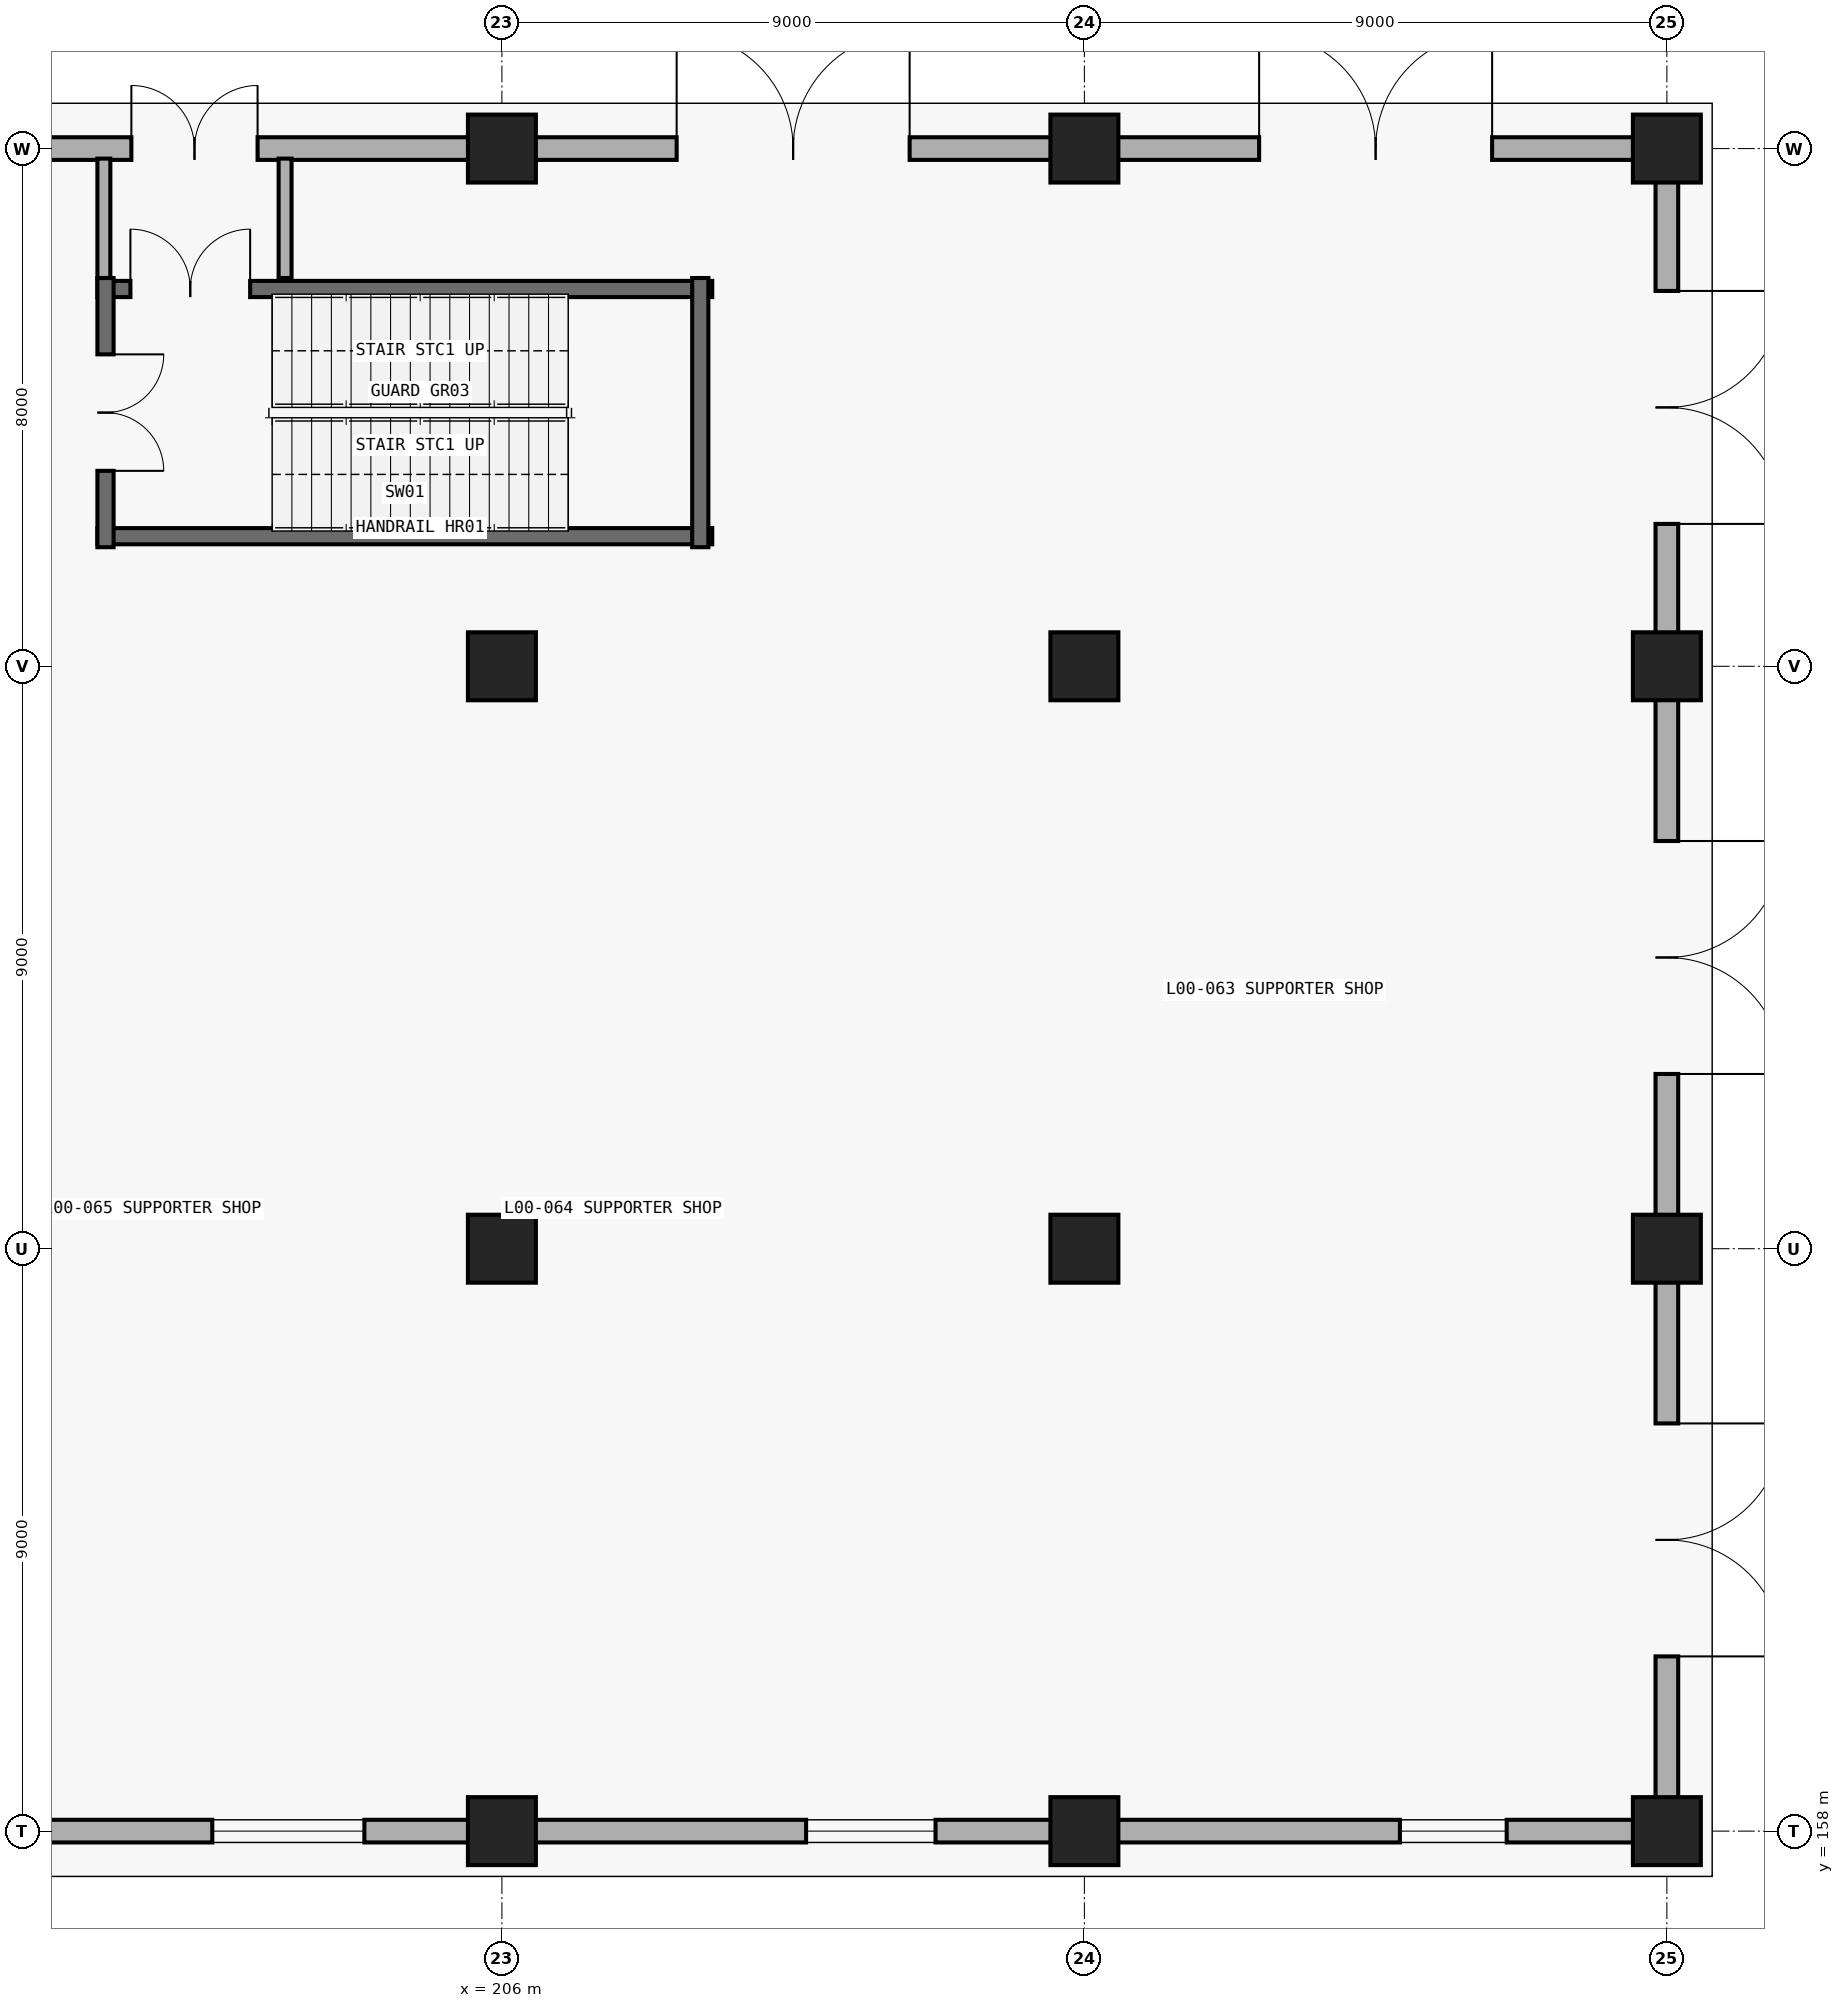
"""IFC4 building model, lengths in metres.
Left out: names, types, materials, properties, quantities, classifications, styles, units other than length and angle.
Written with IfcOpenShell. Run it as: python <this file> out.ifc"""

import sys

from ifc_helpers import new_model, si_unit, direction, frame, frame_2d, origin, origin_2d, place, context, subcontext, project, spatial, rectangle, extrude, element, fill, save


model = new_model("IFC4")
c1 = context("Model", 3, precision=1e-05, world=origin(), true_north=direction((0.0, 1.0)))
c2 = subcontext(c1, "Body", "Model", "MODEL_VIEW")
j1 = project(units=[si_unit("LENGTHUNIT", "METRE"), si_unit("PLANEANGLEUNIT", "RADIAN")], contexts=[c1])
p1 = place(None, origin())
s1 = spatial("IfcSite", under=j1, at=p1, CompositionType="ELEMENT")
p2 = place(p1, origin())
s2 = spatial("IfcBuilding", under=s1, at=p2, CompositionType="ELEMENT")
p3 = place(p2, origin())
s3 = spatial("IfcBuildingStorey", under=s2, at=p3, CompositionType="ELEMENT", Elevation=0.0)
for number, where, z_axis, x_axis in (
    (1, (206.0, 158.0, 0.0), (0.0, 0.0, 1.0), (1.0, 0.0, 0.0)),
    (2, (206.0, 167.0, 0.0), (0.0, 0.0, 1.0), (1.0, 0.0, 0.0)),
    (3, (206.0, 176.0, 0.0), (0.0, 0.0, 1.0), (1.0, 0.0, 0.0)),
    (4, (206.0, 184.0, 0.0), (0.0, 0.0, 1.0), (1.0, 0.0, 0.0)),
    (5, (215.0, 158.0, 0.0), (0.0, 0.0, 1.0), (1.0, 0.0, 0.0)),
    (6, (215.0, 167.0, 0.0), (0.0, 0.0, 1.0), (1.0, 0.0, 0.0)),
    (7, (215.0, 176.0, 0.0), (0.0, 0.0, 1.0), (1.0, 0.0, 0.0)),
    (8, (215.0, 184.0, 0.0), (0.0, 0.0, 1.0), (1.0, 0.0, 0.0)),
    (9, (224.0, 158.0, 0.0), (0.0, 0.0, 1.0), (1.0, 0.0, 0.0)),
    (10, (224.0, 167.0, 0.0), (0.0, 0.0, 1.0), (1.0, 0.0, 0.0)),
    (11, (224.0, 176.0, 0.0), (0.0, 0.0, 1.0), (1.0, 0.0, 0.0)),
    (12, (224.0, 184.0, 0.0), (0.0, 0.0, 1.0), (1.0, 0.0, 0.0)),
):
    element("IfcColumn", number, at=place(p3, frame(where, z_axis=z_axis, x_axis=x_axis)), inside=s3, PredefinedType="COLUMN", context=c2, shape_type="SweptSolid", body=[
        extrude(rectangle(XDim=1.05, YDim=1.05, at=origin_2d()), origin(), (0.0, 0.0, 1.0), 5.4),
    ])
p4 = place(p3, frame((197.5, 184.0, 0.0), z_axis=(0.0, 0.0, 1.0), x_axis=(1.0, 0.0, 0.0)))
e13 = element("IfcWall", 13, at=p4, inside=s3, PredefinedType="STANDARD", context=c2, shape_type="SweptSolid", body=[
    extrude(rectangle(XDim=8.0, YDim=0.35, at=frame_2d((4.0, 0.0))), origin(), (0.0, 0.0, 1.0), 4.384),
])
p5 = place(p4, frame((2.775, 0.0, 0.0)))
e14 = element("IfcOpeningElement", 14, at=p5, cuts=e13, PredefinedType="OPENING", context=c2, shape_type="SweptSolid", body=[
    extrude(rectangle(XDim=1.95, YDim=2.25, at=frame_2d((0.975, 1.125))), frame((0.0, 0.185, 0.0), z_axis=(0.0, -1.0, 0.0), x_axis=(1.0, 0.0, 0.0)), (0.0, 0.0, 1.0), 0.37),
])
p6 = place(p3, frame((206.5, 184.0, 0.0), z_axis=(0.0, 0.0, 1.0), x_axis=(1.0, 0.0, 0.0)))
e15 = element("IfcWall", 15, at=p6, inside=s3, PredefinedType="STANDARD", context=c2, shape_type="SweptSolid", body=[
    extrude(rectangle(XDim=8.0, YDim=0.35, at=frame_2d((4.0, 0.0))), origin(), (0.0, 0.0, 1.0), 4.384),
])
p7 = place(p6, frame((2.2, 0.0, 0.0)))
e16 = element("IfcOpeningElement", 16, at=p7, cuts=e15, PredefinedType="OPENING", context=c2, shape_type="SweptSolid", body=[
    extrude(rectangle(XDim=3.6, YDim=2.7, at=frame_2d((1.8, 1.35))), frame((0.0, 0.185, 0.0), z_axis=(0.0, -1.0, 0.0), x_axis=(1.0, 0.0, 0.0)), (0.0, 0.0, 1.0), 0.37),
])
p8 = place(p3, frame((215.5, 184.0, 0.0), z_axis=(0.0, 0.0, 1.0), x_axis=(1.0, 0.0, 0.0)))
e17 = element("IfcWall", 17, at=p8, inside=s3, PredefinedType="STANDARD", context=c2, shape_type="SweptSolid", body=[
    extrude(rectangle(XDim=8.0, YDim=0.35, at=frame_2d((4.0, 0.0))), origin(), (0.0, 0.0, 1.0), 4.384),
])
p9 = place(p8, frame((2.2, 0.0, 0.0)))
e18 = element("IfcOpeningElement", 18, at=p9, cuts=e17, PredefinedType="OPENING", context=c2, shape_type="SweptSolid", body=[
    extrude(rectangle(XDim=3.6, YDim=2.7, at=frame_2d((1.8, 1.35))), frame((0.0, 0.185, 0.0), z_axis=(0.0, -1.0, 0.0), x_axis=(1.0, 0.0, 0.0)), (0.0, 0.0, 1.0), 0.37),
])
p10 = place(p3, frame((224.0, 183.5, 0.0), z_axis=(0.0, 0.0, 1.0), x_axis=(0.0, -1.0, 0.0)))
e19 = element("IfcWall", 19, at=p10, inside=s3, PredefinedType="STANDARD", context=c2, shape_type="SweptSolid", body=[
    extrude(rectangle(XDim=7.0, YDim=0.35, at=frame_2d((3.5, 0.0))), origin(), (0.0, 0.0, 1.0), 4.417),
])
p11 = place(p10, frame((1.7, 0.0, 0.0)))
e20 = element("IfcOpeningElement", 20, at=p11, cuts=e19, PredefinedType="OPENING", context=c2, shape_type="SweptSolid", body=[
    extrude(rectangle(XDim=3.6, YDim=2.7, at=frame_2d((1.8, 1.35))), frame((0.0, 0.185, 0.0), z_axis=(0.0, -1.0, 0.0), x_axis=(1.0, 0.0, 0.0)), (0.0, 0.0, 1.0), 0.37),
])
p12 = place(p3, frame((224.0, 175.5, 0.0), z_axis=(0.0, 0.0, 1.0), x_axis=(0.0, -1.0, 0.0)))
e21 = element("IfcWall", 21, at=p12, inside=s3, PredefinedType="STANDARD", context=c2, shape_type="SweptSolid", body=[
    extrude(rectangle(XDim=8.0, YDim=0.35, at=frame_2d((4.0, 0.0))), origin(), (0.0, 0.0, 1.0), 4.417),
])
p13 = place(p12, frame((2.2, 0.0, 0.0)))
e22 = element("IfcOpeningElement", 22, at=p13, cuts=e21, PredefinedType="OPENING", context=c2, shape_type="SweptSolid", body=[
    extrude(rectangle(XDim=3.6, YDim=2.7, at=frame_2d((1.8, 1.35))), frame((0.0, 0.185, 0.0), z_axis=(0.0, -1.0, 0.0), x_axis=(1.0, 0.0, 0.0)), (0.0, 0.0, 1.0), 0.37),
])
p14 = place(p3, frame((224.0, 166.5, 0.0), z_axis=(0.0, 0.0, 1.0), x_axis=(0.0, -1.0, 0.0)))
e23 = element("IfcWall", 23, at=p14, inside=s3, PredefinedType="STANDARD", context=c2, shape_type="SweptSolid", body=[
    extrude(rectangle(XDim=8.0, YDim=0.35, at=frame_2d((4.0, 0.0))), origin(), (0.0, 0.0, 1.0), 4.417),
])
p15 = place(p14, frame((2.2, 0.0, 0.0)))
e24 = element("IfcOpeningElement", 24, at=p15, cuts=e23, PredefinedType="OPENING", context=c2, shape_type="SweptSolid", body=[
    extrude(rectangle(XDim=3.6, YDim=2.7, at=frame_2d((1.8, 1.35))), frame((0.0, 0.185, 0.0), z_axis=(0.0, -1.0, 0.0), x_axis=(1.0, 0.0, 0.0)), (0.0, 0.0, 1.0), 0.37),
])
p16 = place(p3, frame((223.5, 158.0, 0.0), z_axis=(0.0, 0.0, 1.0), x_axis=(-1.0, 0.0, 0.0)))
e25 = element("IfcWall", 25, at=p16, inside=s3, PredefinedType="STANDARD", context=c2, shape_type="SweptSolid", body=[
    extrude(rectangle(XDim=8.0, YDim=0.35, at=frame_2d((4.0, 0.0))), origin(), (0.0, 0.0, 1.0), 4.384),
])
p17 = place(p16, frame((1.975, 0.0, 0.95)))
e26 = element("IfcOpeningElement", 26, at=p17, cuts=e25, PredefinedType="OPENING", context=c2, shape_type="SweptSolid", body=[
    extrude(rectangle(XDim=1.65, YDim=2.05, at=frame_2d((0.825, 1.025))), frame((0.0, 0.185, 0.0), z_axis=(0.0, -1.0, 0.0), x_axis=(1.0, 0.0, 0.0)), (0.0, 0.0, 1.0), 0.37),
])
p18 = place(p3, frame((214.5, 158.0, 0.0), z_axis=(0.0, 0.0, 1.0), x_axis=(-1.0, 0.0, 0.0)))
e27 = element("IfcWall", 27, at=p18, inside=s3, PredefinedType="STANDARD", context=c2, shape_type="SweptSolid", body=[
    extrude(rectangle(XDim=8.0, YDim=0.35, at=frame_2d((4.0, 0.0))), origin(), (0.0, 0.0, 1.0), 4.384),
])
p19 = place(p18, frame((1.8, 0.0, 0.95)))
e28 = element("IfcOpeningElement", 28, at=p19, cuts=e27, PredefinedType="OPENING", context=c2, shape_type="SweptSolid", body=[
    extrude(rectangle(XDim=2.0, YDim=1.9, at=frame_2d((1.0, 0.95))), frame((0.0, 0.185, 0.0), z_axis=(0.0, -1.0, 0.0), x_axis=(1.0, 0.0, 0.0)), (0.0, 0.0, 1.0), 0.37),
])
p20 = place(p3, frame((205.5, 158.0, 0.0), z_axis=(0.0, 0.0, 1.0), x_axis=(-1.0, 0.0, 0.0)))
e29 = element("IfcWall", 29, at=p20, inside=s3, PredefinedType="STANDARD", context=c2, shape_type="SweptSolid", body=[
    extrude(rectangle(XDim=8.0, YDim=0.35, at=frame_2d((4.0, 0.0))), origin(), (0.0, 0.0, 1.0), 4.384),
])
p21 = place(p20, frame((1.625, 0.0, 0.95)))
e30 = element("IfcOpeningElement", 30, at=p21, cuts=e29, PredefinedType="OPENING", context=c2, shape_type="SweptSolid", body=[
    extrude(rectangle(XDim=2.35, YDim=2.0, at=frame_2d((1.175, 1.0))), frame((0.0, 0.185, 0.0), z_axis=(0.0, -1.0, 0.0), x_axis=(1.0, 0.0, 0.0)), (0.0, 0.0, 1.0), 0.37),
])
p22 = place(p3, frame((199.75, 178.01, 0.0), z_axis=(0.0, 0.0, 1.0), x_axis=(1.0, 0.0, 0.0)))
e31 = element("IfcWall", 31, at=p22, inside=s3, PredefinedType="SHEAR", context=c2, shape_type="SweptSolid", body=[
    extrude(rectangle(XDim=9.5, YDim=0.25, at=frame_2d((4.75, 0.0))), origin(), (0.0, 0.0, 1.0), 5.1),
])
p23 = place(p3, frame((199.75, 181.83, 0.0), z_axis=(0.0, 0.0, 1.0), x_axis=(1.0, 0.0, 0.0)))
e32 = element("IfcWall", 32, at=p23, inside=s3, PredefinedType="SHEAR", context=c2, shape_type="SweptSolid", body=[
    extrude(rectangle(XDim=9.5, YDim=0.25, at=frame_2d((4.75, 0.0))), origin(), (0.0, 0.0, 1.0), 5.1),
])
p24 = place(p23, frame((0.51, 0.0, 0.0)))
e33 = element("IfcOpeningElement", 33, at=p24, cuts=e32, PredefinedType="OPENING", context=c2, shape_type="SweptSolid", body=[
    extrude(rectangle(XDim=1.85, YDim=2.3, at=frame_2d((0.925, 1.15))), frame((0.0, 0.135, 0.0), z_axis=(0.0, -1.0, 0.0), x_axis=(1.0, 0.0, 0.0)), (0.0, 0.0, 1.0), 0.27),
])
p25 = place(p3, frame((199.875, 182.0, 0.0), z_axis=(0.0, 0.0, 1.0), x_axis=(0.0, -1.0, 0.0)))
e34 = element("IfcWall", 34, at=p25, inside=s3, PredefinedType="SHEAR", context=c2, shape_type="SweptSolid", body=[
    extrude(rectangle(XDim=4.16, YDim=0.25, at=frame_2d((2.08, 0.0))), origin(), (0.0, 0.0, 1.0), 5.1),
])
p26 = place(p25, frame((1.18, 0.0, 0.0)))
e35 = element("IfcOpeningElement", 35, at=p26, cuts=e34, PredefinedType="OPENING", context=c2, shape_type="SweptSolid", body=[
    extrude(rectangle(XDim=1.8, YDim=2.25, at=frame_2d((0.9, 1.125))), frame((0.0, 0.135, 0.0), z_axis=(0.0, -1.0, 0.0), x_axis=(1.0, 0.0, 0.0)), (0.0, 0.0, 1.0), 0.27),
])
p27 = place(p3, frame((209.065, 177.84, 0.0), z_axis=(0.0, 0.0, 1.0), x_axis=(0.0, 1.0, 0.0)))
e36 = element("IfcWall", 36, at=p27, inside=s3, PredefinedType="SHEAR", context=c2, shape_type="SweptSolid", body=[
    extrude(rectangle(XDim=4.16, YDim=0.25, at=frame_2d((2.08, 0.0))), origin(), (0.0, 0.0, 1.0), 5.1),
])
for number, where, z_axis, x_axis in (
    (37, (199.85, 182.0, 0.0), (0.0, 0.0, 1.0), (0.0, 1.0, 0.0)),
    (38, (202.65, 182.0, 0.0), (0.0, 0.0, 1.0), (0.0, 1.0, 0.0)),
):
    element("IfcWall", number, at=place(p3, frame(where, z_axis=z_axis, x_axis=x_axis)), inside=s3, PredefinedType="PARTITIONING", context=c2, shape_type="SweptSolid", body=[
        extrude(rectangle(XDim=1.845, YDim=0.2, at=frame_2d((0.922, 0.0))), origin(), (0.0, 0.0, 1.0), 4.384),
    ])
p28 = place(p5, origin())
e39 = element("IfcDoor", 39, at=p28, inside=s3, OperationType="DOUBLE_DOOR_SINGLE_SWING", PredefinedType="DOOR", context=c2, shape_type="SweptSolid", body=[
    extrude(rectangle(XDim=1.95, YDim=2.25, at=frame_2d((0.975, 1.125))), frame((0.0, 0.025, 0.0), z_axis=(0.0, -1.0, 0.0), x_axis=(1.0, 0.0, 0.0)), (0.0, 0.0, 1.0), 0.05),
])
fill(e14, e39)
p29 = place(p7, origin())
e40 = element("IfcDoor", 40, at=p29, inside=s3, OperationType="DOUBLE_DOOR_SINGLE_SWING", PredefinedType="DOOR", context=c2, shape_type="SweptSolid", body=[
    extrude(rectangle(XDim=3.6, YDim=2.7, at=frame_2d((1.8, 1.35))), frame((0.0, 0.025, 0.0), z_axis=(0.0, -1.0, 0.0), x_axis=(1.0, 0.0, 0.0)), (0.0, 0.0, 1.0), 0.05),
])
fill(e16, e40)
p30 = place(p9, origin())
e41 = element("IfcDoor", 41, at=p30, inside=s3, OperationType="DOUBLE_DOOR_SINGLE_SWING", PredefinedType="DOOR", context=c2, shape_type="SweptSolid", body=[
    extrude(rectangle(XDim=3.6, YDim=2.7, at=frame_2d((1.8, 1.35))), frame((0.0, 0.025, 0.0), z_axis=(0.0, -1.0, 0.0), x_axis=(1.0, 0.0, 0.0)), (0.0, 0.0, 1.0), 0.05),
])
fill(e18, e41)
p31 = place(p11, origin())
e42 = element("IfcDoor", 42, at=p31, inside=s3, OperationType="DOUBLE_DOOR_SINGLE_SWING", PredefinedType="DOOR", context=c2, shape_type="SweptSolid", body=[
    extrude(rectangle(XDim=3.6, YDim=2.7, at=frame_2d((1.8, 1.35))), frame((0.0, 0.025, 0.0), z_axis=(0.0, -1.0, 0.0), x_axis=(1.0, 0.0, 0.0)), (0.0, 0.0, 1.0), 0.05),
])
fill(e20, e42)
p32 = place(p13, origin())
e43 = element("IfcDoor", 43, at=p32, inside=s3, OperationType="DOUBLE_DOOR_SINGLE_SWING", PredefinedType="DOOR", context=c2, shape_type="SweptSolid", body=[
    extrude(rectangle(XDim=3.6, YDim=2.7, at=frame_2d((1.8, 1.35))), frame((0.0, 0.025, 0.0), z_axis=(0.0, -1.0, 0.0), x_axis=(1.0, 0.0, 0.0)), (0.0, 0.0, 1.0), 0.05),
])
fill(e22, e43)
p33 = place(p15, origin())
e44 = element("IfcDoor", 44, at=p33, inside=s3, OperationType="DOUBLE_DOOR_SINGLE_SWING", PredefinedType="DOOR", context=c2, shape_type="SweptSolid", body=[
    extrude(rectangle(XDim=3.6, YDim=2.7, at=frame_2d((1.8, 1.35))), frame((0.0, 0.025, 0.0), z_axis=(0.0, -1.0, 0.0), x_axis=(1.0, 0.0, 0.0)), (0.0, 0.0, 1.0), 0.05),
])
fill(e24, e44)
p34 = place(p17, origin())
e45 = element("IfcWindow", 45, at=p34, inside=s3, PartitioningType="SINGLE_PANEL", PredefinedType="WINDOW", context=c2, shape_type="SweptSolid", body=[
    extrude(rectangle(XDim=1.65, YDim=2.05, at=frame_2d((0.825, 1.025))), frame((0.0, 0.03, 0.0), z_axis=(0.0, -1.0, 0.0), x_axis=(1.0, 0.0, 0.0)), (0.0, 0.0, 1.0), 0.06),
])
fill(e26, e45)
p35 = place(p19, origin())
e46 = element("IfcWindow", 46, at=p35, inside=s3, PartitioningType="SINGLE_PANEL", PredefinedType="WINDOW", context=c2, shape_type="SweptSolid", body=[
    extrude(rectangle(XDim=2.0, YDim=1.9, at=frame_2d((1.0, 0.95))), frame((0.0, 0.03, 0.0), z_axis=(0.0, -1.0, 0.0), x_axis=(1.0, 0.0, 0.0)), (0.0, 0.0, 1.0), 0.06),
])
fill(e28, e46)
p36 = place(p21, origin())
e47 = element("IfcWindow", 47, at=p36, inside=s3, PartitioningType="SINGLE_PANEL", PredefinedType="WINDOW", context=c2, shape_type="SweptSolid", body=[
    extrude(rectangle(XDim=2.35, YDim=2.0, at=frame_2d((1.175, 1.0))), frame((0.0, 0.03, 0.0), z_axis=(0.0, -1.0, 0.0), x_axis=(1.0, 0.0, 0.0)), (0.0, 0.0, 1.0), 0.06),
])
fill(e30, e47)
p37 = place(p26, origin())
e48 = element("IfcDoor", 48, at=p37, inside=s3, OperationType="DOUBLE_DOOR_SINGLE_SWING", PredefinedType="DOOR", context=c2, shape_type="SweptSolid", body=[
    extrude(rectangle(XDim=1.8, YDim=2.25, at=frame_2d((0.9, 1.125))), frame((0.0, 0.025, 0.0), z_axis=(0.0, -1.0, 0.0), x_axis=(1.0, 0.0, 0.0)), (0.0, 0.0, 1.0), 0.05),
])
fill(e35, e48)
p38 = place(p24, origin())
e49 = element("IfcDoor", 49, at=p38, inside=s3, OperationType="DOUBLE_DOOR_SINGLE_SWING", PredefinedType="DOOR", context=c2, shape_type="SweptSolid", body=[
    extrude(rectangle(XDim=1.85, YDim=2.3, at=frame_2d((0.925, 1.15))), frame((0.0, 0.025, 0.0), z_axis=(0.0, -1.0, 0.0), x_axis=(1.0, 0.0, 0.0)), (0.0, 0.0, 1.0), 0.05),
])
fill(e33, e49)
save(model, sys.argv[1])
